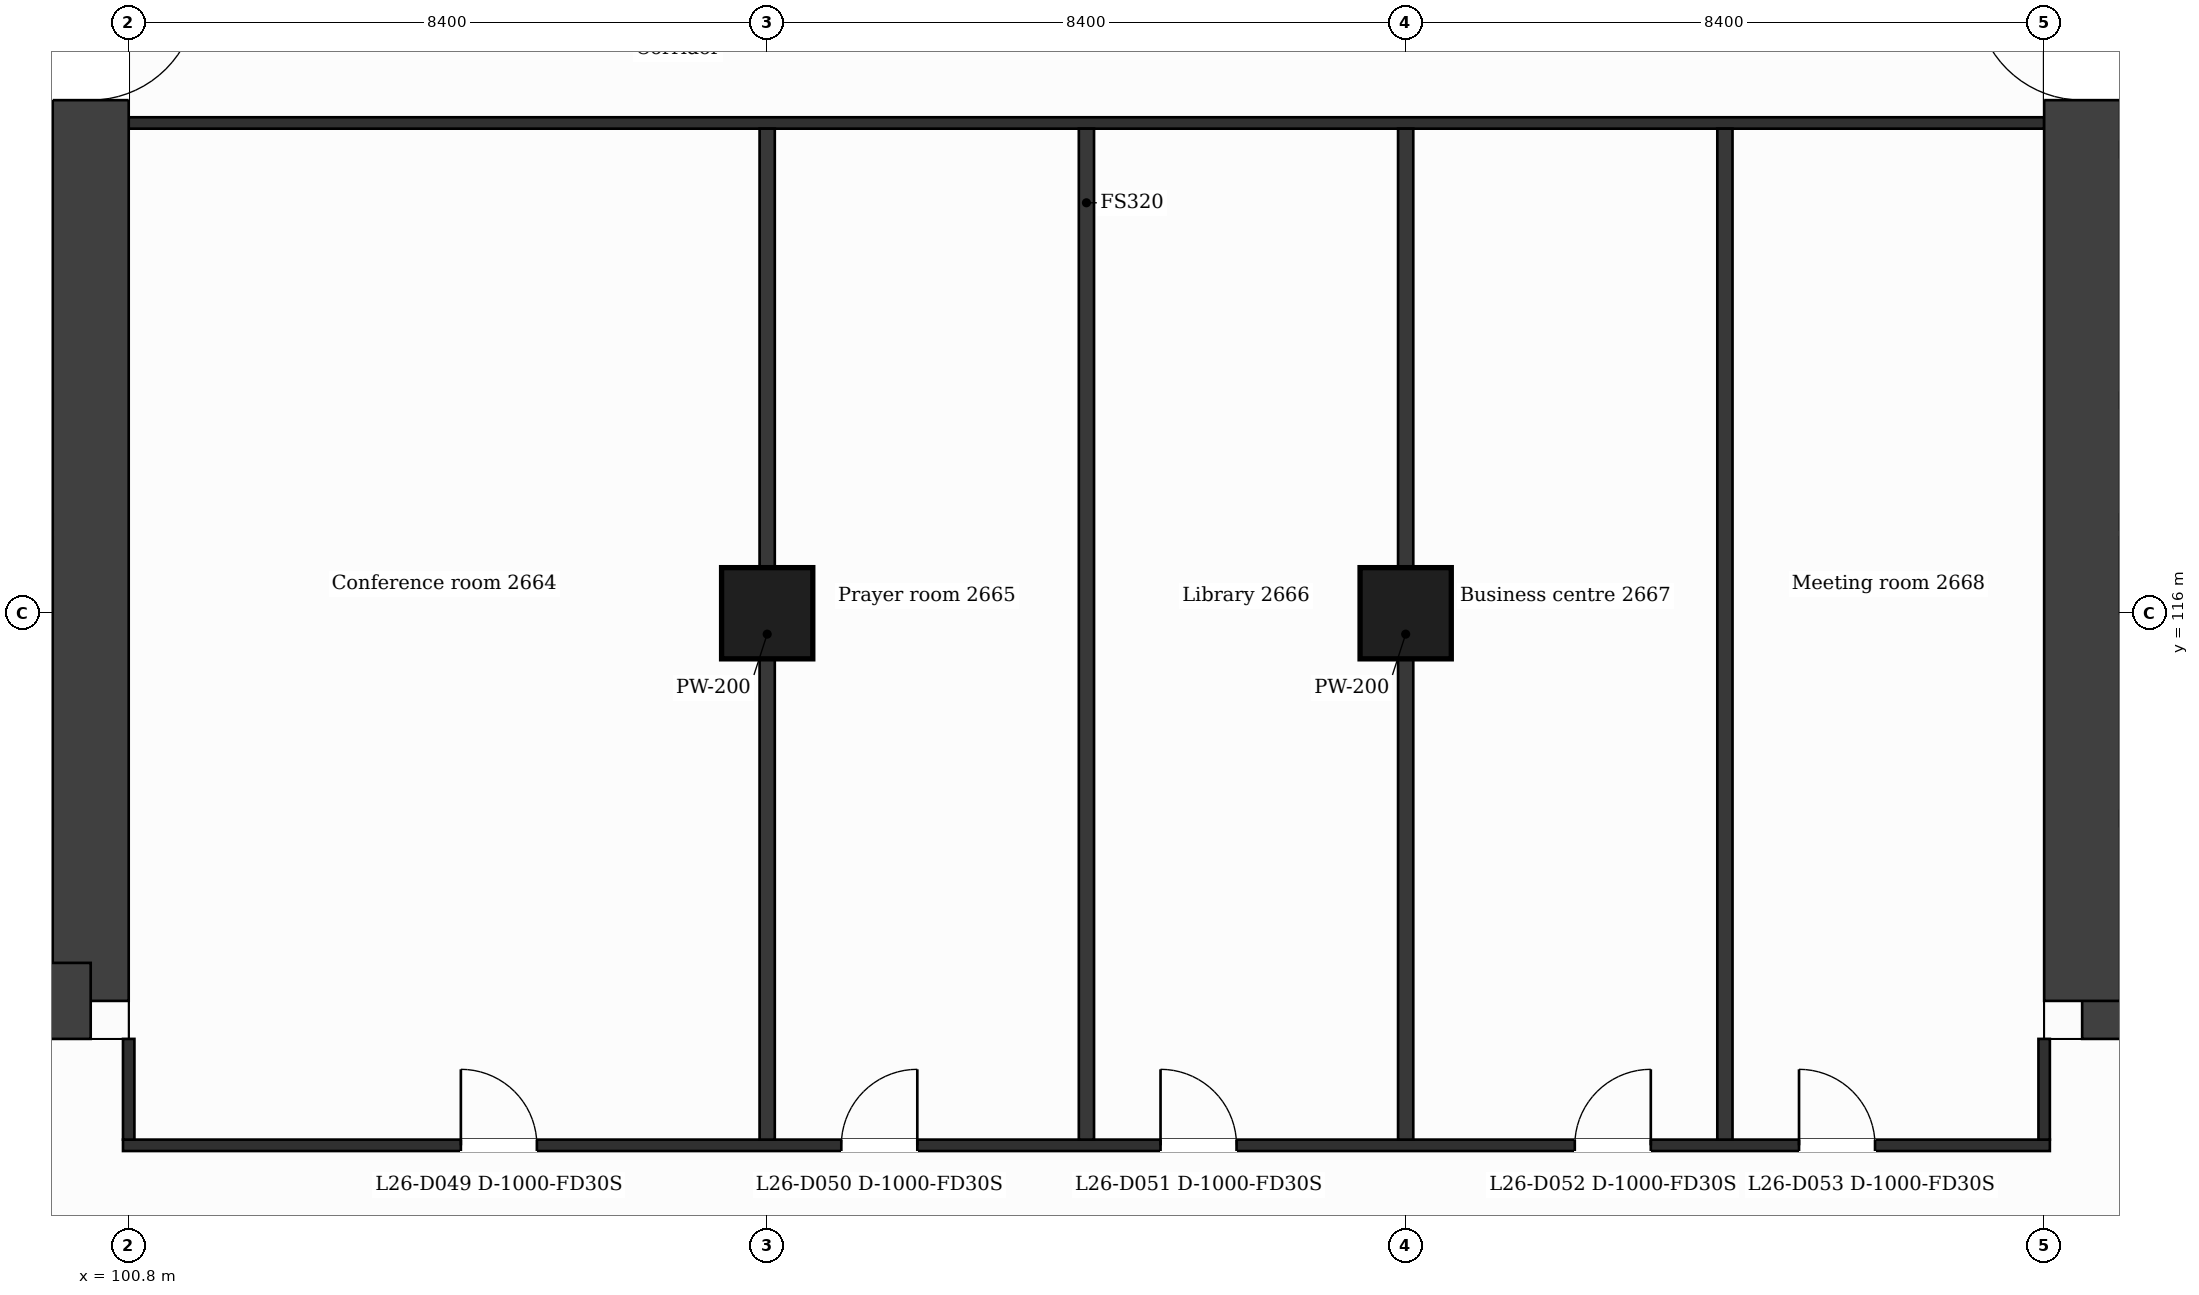
"""IFC4 building model, lengths in metres.
Left out: names, types, materials, properties, quantities, classifications, styles, units other than length and angle.
Written with IfcOpenShell. Run it as: python <this file> out.ifc"""

import sys

from ifc_helpers import new_model, si_unit, direction, frame, frame_2d, origin, origin_2d, place, context, subcontext, project, spatial, rectangle, extrude, element, fill, save


model = new_model("IFC4")
c1 = context("Model", 3, precision=1e-05, world=origin(), true_north=direction((0.0, 1.0)))
c2 = subcontext(c1, "Body", "Model", "MODEL_VIEW")
j1 = project(units=[si_unit("LENGTHUNIT", "METRE"), si_unit("PLANEANGLEUNIT", "RADIAN")], contexts=[c1])
p1 = place(None, origin())
s1 = spatial("IfcSite", under=j1, at=p1, CompositionType="ELEMENT")
p2 = place(p1, origin())
s2 = spatial("IfcBuilding", under=s1, at=p2, CompositionType="ELEMENT")
p3 = place(p2, frame((0.0, 0.0, 113.2)))
s3 = spatial("IfcBuildingStorey", under=s2, at=p3, CompositionType="ELEMENT", Elevation=113.2)
p4 = place(p3, frame((100.3, 131.9, 0.0), z_axis=(0.0, 0.0, 1.0), x_axis=(0.0, -1.0, 0.0)))
e1 = element("IfcWall", 1, at=p4, inside=s3, PredefinedType="SHEAR", context=c2, shape_type="SweptSolid", body=[
    extrude(rectangle(XDim=21.0, YDim=1.0, at=frame_2d((10.5, 0.0))), origin(), (0.0, 0.0, 1.0), 3.7),
])
p5 = place(p4, frame((7.75, 0.0, 0.0)))
e2 = element("IfcOpeningElement", 2, at=p5, cuts=e1, PredefinedType="OPENING", context=c2, shape_type="SweptSolid", body=[
    extrude(rectangle(XDim=1.4, YDim=2.1, at=frame_2d((0.7, 1.05))), frame((0.0, 0.51, 0.0), z_axis=(0.0, -1.0, 0.0), x_axis=(1.0, 0.0, 0.0)), (0.0, 0.0, 1.0), 1.02),
])
p6 = place(p3, frame((100.3, 110.9, 0.0), z_axis=(0.0, 0.0, 1.0), x_axis=(-1.0, 0.0, 0.0)))
e3 = element("IfcWall", 3, at=p6, inside=s3, PredefinedType="SHEAR", context=c2, shape_type="SweptSolid", body=[
    extrude(rectangle(XDim=14.059, YDim=1.0, at=frame_2d((7.03, 0.0))), origin(), (0.0, 0.0, 1.0), 3.7),
])
p7 = place(p6, frame((5.802, 0.0, 0.0)))
e4 = element("IfcOpeningElement", 4, at=p7, cuts=e3, PredefinedType="OPENING", context=c2, shape_type="SweptSolid", body=[
    extrude(rectangle(XDim=1.4, YDim=2.1, at=frame_2d((0.7, 1.05))), frame((0.0, 0.51, 0.0), z_axis=(0.0, -1.0, 0.0), x_axis=(1.0, 0.0, 0.0)), (0.0, 0.0, 1.0), 1.02),
])
p8 = place(p3, frame((94.9, 116.5, 0.0), z_axis=(0.0, 0.0, 1.0), x_axis=(1.0, 0.0, 0.0)))
e5 = element("IfcWall", 5, at=p8, inside=s3, PredefinedType="SHEAR", context=c2, shape_type="SweptSolid", body=[
    extrude(rectangle(XDim=4.9, YDim=1.0, at=frame_2d((2.45, 0.0))), origin(), (0.0, 0.0, 1.0), 3.7),
])
p9 = place(p3, frame((140.559, 110.9, 0.0), z_axis=(0.0, 0.0, 1.0), x_axis=(-1.0, 0.0, 0.0)))
e6 = element("IfcWall", 6, at=p9, inside=s3, PredefinedType="SHEAR", context=c2, shape_type="SweptSolid", body=[
    extrude(rectangle(XDim=14.059, YDim=1.0, at=frame_2d((7.029, 0.0))), origin(), (0.0, 0.0, 1.0), 3.7),
])
p10 = place(p9, frame((6.858, 0.0, 0.0)))
e7 = element("IfcOpeningElement", 7, at=p10, cuts=e6, PredefinedType="OPENING", context=c2, shape_type="SweptSolid", body=[
    extrude(rectangle(XDim=1.4, YDim=2.1, at=frame_2d((0.7, 1.05))), frame((0.0, 0.51, 0.0), z_axis=(0.0, -1.0, 0.0), x_axis=(1.0, 0.0, 0.0)), (0.0, 0.0, 1.0), 1.02),
])
p11 = place(p3, frame((126.5, 110.9, 0.0), z_axis=(0.0, 0.0, 1.0), x_axis=(0.0, 1.0, 0.0)))
e8 = element("IfcWall", 8, at=p11, inside=s3, PredefinedType="SHEAR", context=c2, shape_type="SweptSolid", body=[
    extrude(rectangle(XDim=21.0, YDim=1.0, at=frame_2d((10.5, 0.0))), origin(), (0.0, 0.0, 1.0), 3.7),
])
p12 = place(p11, frame((11.85, 0.0, 0.0)))
e9 = element("IfcOpeningElement", 9, at=p12, cuts=e8, PredefinedType="OPENING", context=c2, shape_type="SweptSolid", body=[
    extrude(rectangle(XDim=1.4, YDim=2.1, at=frame_2d((0.7, 1.05))), frame((0.0, 0.51, 0.0), z_axis=(0.0, -1.0, 0.0), x_axis=(1.0, 0.0, 0.0)), (0.0, 0.0, 1.0), 1.02),
])
for number, where, z_axis, x_axis in (
    (10, (109.2, 116.0, 0.0), (0.0, 0.0, 1.0), (1.0, 0.0, 0.0)),
    (11, (117.6, 116.0, 0.0), (0.0, 0.0, 1.0), (1.0, 0.0, 0.0)),
):
    element("IfcColumn", number, at=place(p3, frame(where, z_axis=z_axis, x_axis=x_axis)), inside=s3, PredefinedType="COLUMN", context=c2, shape_type="SweptSolid", body=[
        extrude(rectangle(XDim=1.2, YDim=1.2, at=origin_2d()), origin(), (0.0, 0.0, 1.0), 3.7),
    ])
p13 = place(p3, frame((100.725, 109.0, 0.0), z_axis=(0.0, 0.0, 1.0), x_axis=(1.0, 0.0, 0.0)))
e12 = element("IfcWall", 12, at=p13, inside=s3, PredefinedType="PARTITIONING", context=c2, shape_type="SweptSolid", body=[
    extrude(rectangle(XDim=25.35, YDim=0.15, at=frame_2d((12.675, 0.0))), origin(), (0.0, 0.0, 1.0), 3.38),
])
p14 = place(p13, frame((4.445, 0.0, 0.0)))
e13 = element("IfcOpeningElement", 13, at=p14, cuts=e12, PredefinedType="OPENING", context=c2, shape_type="SweptSolid", body=[
    extrude(rectangle(XDim=1.0, YDim=2.1, at=frame_2d((0.5, 1.05))), frame((0.0, 0.085, 0.0), z_axis=(0.0, -1.0, 0.0), x_axis=(1.0, 0.0, 0.0)), (0.0, 0.0, 1.0), 0.17),
])
p15 = place(p13, frame((9.45, 0.0, 0.0)))
e14 = element("IfcOpeningElement", 14, at=p15, cuts=e12, PredefinedType="OPENING", context=c2, shape_type="SweptSolid", body=[
    extrude(rectangle(XDim=1.0, YDim=2.1, at=frame_2d((0.5, 1.05))), frame((0.0, 0.085, 0.0), z_axis=(0.0, -1.0, 0.0), x_axis=(1.0, 0.0, 0.0)), (0.0, 0.0, 1.0), 0.17),
])
p16 = place(p13, frame((13.65, 0.0, 0.0)))
e15 = element("IfcOpeningElement", 15, at=p16, cuts=e12, PredefinedType="OPENING", context=c2, shape_type="SweptSolid", body=[
    extrude(rectangle(XDim=1.0, YDim=2.1, at=frame_2d((0.5, 1.05))), frame((0.0, 0.085, 0.0), z_axis=(0.0, -1.0, 0.0), x_axis=(1.0, 0.0, 0.0)), (0.0, 0.0, 1.0), 0.17),
])
p17 = place(p13, frame((19.1, 0.0, 0.0)))
e16 = element("IfcOpeningElement", 16, at=p17, cuts=e12, PredefinedType="OPENING", context=c2, shape_type="SweptSolid", body=[
    extrude(rectangle(XDim=1.0, YDim=2.1, at=frame_2d((0.5, 1.05))), frame((0.0, 0.085, 0.0), z_axis=(0.0, -1.0, 0.0), x_axis=(1.0, 0.0, 0.0)), (0.0, 0.0, 1.0), 0.17),
])
p18 = place(p13, frame((22.05, 0.0, 0.0)))
e17 = element("IfcOpeningElement", 17, at=p18, cuts=e12, PredefinedType="OPENING", context=c2, shape_type="SweptSolid", body=[
    extrude(rectangle(XDim=1.0, YDim=2.1, at=frame_2d((0.5, 1.05))), frame((0.0, 0.085, 0.0), z_axis=(0.0, -1.0, 0.0), x_axis=(1.0, 0.0, 0.0)), (0.0, 0.0, 1.0), 0.17),
])
p19 = place(p3, frame((127.0, 113.3, 0.0), z_axis=(0.0, 0.0, 1.0), x_axis=(1.0, 0.0, 0.0)))
e18 = element("IfcWall", 18, at=p19, inside=s3, PredefinedType="PARTITIONING", context=c2, shape_type="SweptSolid", body=[
    extrude(rectangle(XDim=4.673, YDim=0.2, at=frame_2d((2.336, 0.0))), origin(), (0.0, 0.0, 1.0), 3.38),
])
p20 = place(p19, frame((0.642, 0.0, 0.0)))
e19 = element("IfcOpeningElement", 19, at=p20, cuts=e18, PredefinedType="OPENING", context=c2, shape_type="SweptSolid", body=[
    extrude(rectangle(XDim=1.1, YDim=2.1, at=frame_2d((0.55, 1.05))), frame((0.0, 0.11, 0.0), z_axis=(0.0, -1.0, 0.0), x_axis=(1.0, 0.0, 0.0)), (0.0, 0.0, 1.0), 0.22),
])
for number, where, z_axis, x_axis in (
    (20, (95.227, 117.2, 0.0), (0.0, 0.0, 1.0), (1.0, 0.0, 0.0)),
    (21, (95.227, 118.8, 0.0), (0.0, 0.0, 1.0), (1.0, 0.0, 0.0)),
):
    element("IfcWall", number, at=place(p3, frame(where, z_axis=z_axis, x_axis=x_axis)), inside=s3, PredefinedType="PARTITIONING", context=c2, shape_type="SweptSolid", body=[
        extrude(rectangle(XDim=4.573, YDim=0.2, at=frame_2d((2.287, 0.0))), origin(), (0.0, 0.0, 1.0), 3.38),
    ])
p21 = place(p3, frame((95.227, 122.1, 0.0), z_axis=(0.0, 0.0, 1.0), x_axis=(1.0, 0.0, 0.0)))
e22 = element("IfcWall", 22, at=p21, inside=s3, PredefinedType="PARTITIONING", context=c2, shape_type="SweptSolid", body=[
    extrude(rectangle(XDim=4.573, YDim=0.2, at=frame_2d((2.287, 0.0))), origin(), (0.0, 0.0, 1.0), 3.38),
])
p22 = place(p21, frame((0.693, 0.0, 0.0)))
e23 = element("IfcOpeningElement", 23, at=p22, cuts=e22, PredefinedType="OPENING", context=c2, shape_type="SweptSolid", body=[
    extrude(rectangle(XDim=0.9, YDim=2.1, at=frame_2d((0.45, 1.05))), frame((0.0, 0.11, 0.0), z_axis=(0.0, -1.0, 0.0), x_axis=(1.0, 0.0, 0.0)), (0.0, 0.0, 1.0), 0.22),
])
p23 = place(p21, frame((3.151, 0.0, 0.0)))
e24 = element("IfcOpeningElement", 24, at=p23, cuts=e22, PredefinedType="OPENING", context=c2, shape_type="SweptSolid", body=[
    extrude(rectangle(XDim=0.9, YDim=2.1, at=frame_2d((0.45, 1.05))), frame((0.0, 0.11, 0.0), z_axis=(0.0, -1.0, 0.0), x_axis=(1.0, 0.0, 0.0)), (0.0, 0.0, 1.0), 0.22),
])
p24 = place(p3, frame((100.8, 122.45, 0.0), z_axis=(0.0, 0.0, 1.0), x_axis=(1.0, 0.0, 0.0)))
e25 = element("IfcWall", 25, at=p24, inside=s3, PredefinedType="PARTITIONING", context=c2, shape_type="SweptSolid", body=[
    extrude(rectangle(XDim=25.2, YDim=0.15, at=frame_2d((12.6, 0.0))), origin(), (0.0, 0.0, 1.0), 3.38),
])
p25 = place(p3, frame((100.8, 109.075, 0.0), z_axis=(0.0, 0.0, 1.0), x_axis=(0.0, 1.0, 0.0)))
e26 = element("IfcWall", 26, at=p25, inside=s3, PredefinedType="PARTITIONING", context=c2, shape_type="SweptSolid", body=[
    extrude(rectangle(XDim=1.325, YDim=0.15, at=frame_2d((0.663, 0.0))), origin(), (0.0, 0.0, 1.0), 3.38),
])
for number, where, z_axis, x_axis in (
    (27, (109.2, 109.075, 0.0), (0.0, 0.0, 1.0), (0.0, 1.0, 0.0)),
    (28, (113.4, 109.075, 0.0), (0.0, 0.0, 1.0), (0.0, 1.0, 0.0)),
    (29, (117.6, 109.075, 0.0), (0.0, 0.0, 1.0), (0.0, 1.0, 0.0)),
    (30, (121.8, 109.075, 0.0), (0.0, 0.0, 1.0), (0.0, 1.0, 0.0)),
):
    element("IfcWall", number, at=place(p3, frame(where, z_axis=z_axis, x_axis=x_axis)), inside=s3, PredefinedType="PARTITIONING", context=c2, shape_type="SweptSolid", body=[
        extrude(rectangle(XDim=13.3, YDim=0.2, at=frame_2d((6.65, 0.0))), origin(), (0.0, 0.0, 1.0), 3.38),
    ])
p26 = place(p3, frame((126.0, 109.075, 0.0), z_axis=(0.0, 0.0, 1.0), x_axis=(0.0, 1.0, 0.0)))
e31 = element("IfcWall", 31, at=p26, inside=s3, PredefinedType="PARTITIONING", context=c2, shape_type="SweptSolid", body=[
    extrude(rectangle(XDim=1.325, YDim=0.15, at=frame_2d((0.663, 0.0))), origin(), (0.0, 0.0, 1.0), 3.38),
])
p27 = place(p14, origin())
e32 = element("IfcDoor", 32, at=p27, inside=s3, OperationType="SINGLE_SWING_LEFT", PredefinedType="DOOR", context=c2, shape_type="SweptSolid", body=[
    extrude(rectangle(XDim=1.0, YDim=2.1, at=frame_2d((0.5, 1.05))), frame((0.0, 0.025, 0.0), z_axis=(0.0, -1.0, 0.0), x_axis=(1.0, 0.0, 0.0)), (0.0, 0.0, 1.0), 0.05),
])
fill(e13, e32)
p28 = place(p15, origin())
e33 = element("IfcDoor", 33, at=p28, inside=s3, OperationType="SINGLE_SWING_RIGHT", PredefinedType="DOOR", context=c2, shape_type="SweptSolid", body=[
    extrude(rectangle(XDim=1.0, YDim=2.1, at=frame_2d((0.5, 1.05))), frame((0.0, 0.025, 0.0), z_axis=(0.0, -1.0, 0.0), x_axis=(1.0, 0.0, 0.0)), (0.0, 0.0, 1.0), 0.05),
])
fill(e14, e33)
p29 = place(p16, origin())
e34 = element("IfcDoor", 34, at=p29, inside=s3, OperationType="SINGLE_SWING_LEFT", PredefinedType="DOOR", context=c2, shape_type="SweptSolid", body=[
    extrude(rectangle(XDim=1.0, YDim=2.1, at=frame_2d((0.5, 1.05))), frame((0.0, 0.025, 0.0), z_axis=(0.0, -1.0, 0.0), x_axis=(1.0, 0.0, 0.0)), (0.0, 0.0, 1.0), 0.05),
])
fill(e15, e34)
p30 = place(p17, origin())
e35 = element("IfcDoor", 35, at=p30, inside=s3, OperationType="SINGLE_SWING_RIGHT", PredefinedType="DOOR", context=c2, shape_type="SweptSolid", body=[
    extrude(rectangle(XDim=1.0, YDim=2.1, at=frame_2d((0.5, 1.05))), frame((0.0, 0.025, 0.0), z_axis=(0.0, -1.0, 0.0), x_axis=(1.0, 0.0, 0.0)), (0.0, 0.0, 1.0), 0.05),
])
fill(e16, e35)
p31 = place(p18, origin())
e36 = element("IfcDoor", 36, at=p31, inside=s3, OperationType="SINGLE_SWING_LEFT", PredefinedType="DOOR", context=c2, shape_type="SweptSolid", body=[
    extrude(rectangle(XDim=1.0, YDim=2.1, at=frame_2d((0.5, 1.05))), frame((0.0, 0.025, 0.0), z_axis=(0.0, -1.0, 0.0), x_axis=(1.0, 0.0, 0.0)), (0.0, 0.0, 1.0), 0.05),
])
fill(e17, e36)
p32 = place(p5, origin())
e37 = element("IfcDoor", 37, at=p32, inside=s3, OperationType="SINGLE_SWING_LEFT", PredefinedType="DOOR", context=c2, shape_type="SweptSolid", body=[
    extrude(rectangle(XDim=1.4, YDim=2.1, at=frame_2d((0.7, 1.05))), frame((0.0, 0.025, 0.0), z_axis=(0.0, -1.0, 0.0), x_axis=(1.0, 0.0, 0.0)), (0.0, 0.0, 1.0), 0.05),
])
fill(e2, e37)
p33 = place(p12, origin())
e38 = element("IfcDoor", 38, at=p33, inside=s3, OperationType="SINGLE_SWING_RIGHT", PredefinedType="DOOR", context=c2, shape_type="SweptSolid", body=[
    extrude(rectangle(XDim=1.4, YDim=2.1, at=frame_2d((0.7, 1.05))), frame((0.0, 0.025, 0.0), z_axis=(0.0, -1.0, 0.0), x_axis=(1.0, 0.0, 0.0)), (0.0, 0.0, 1.0), 0.05),
])
fill(e9, e38)
save(model, sys.argv[1])
